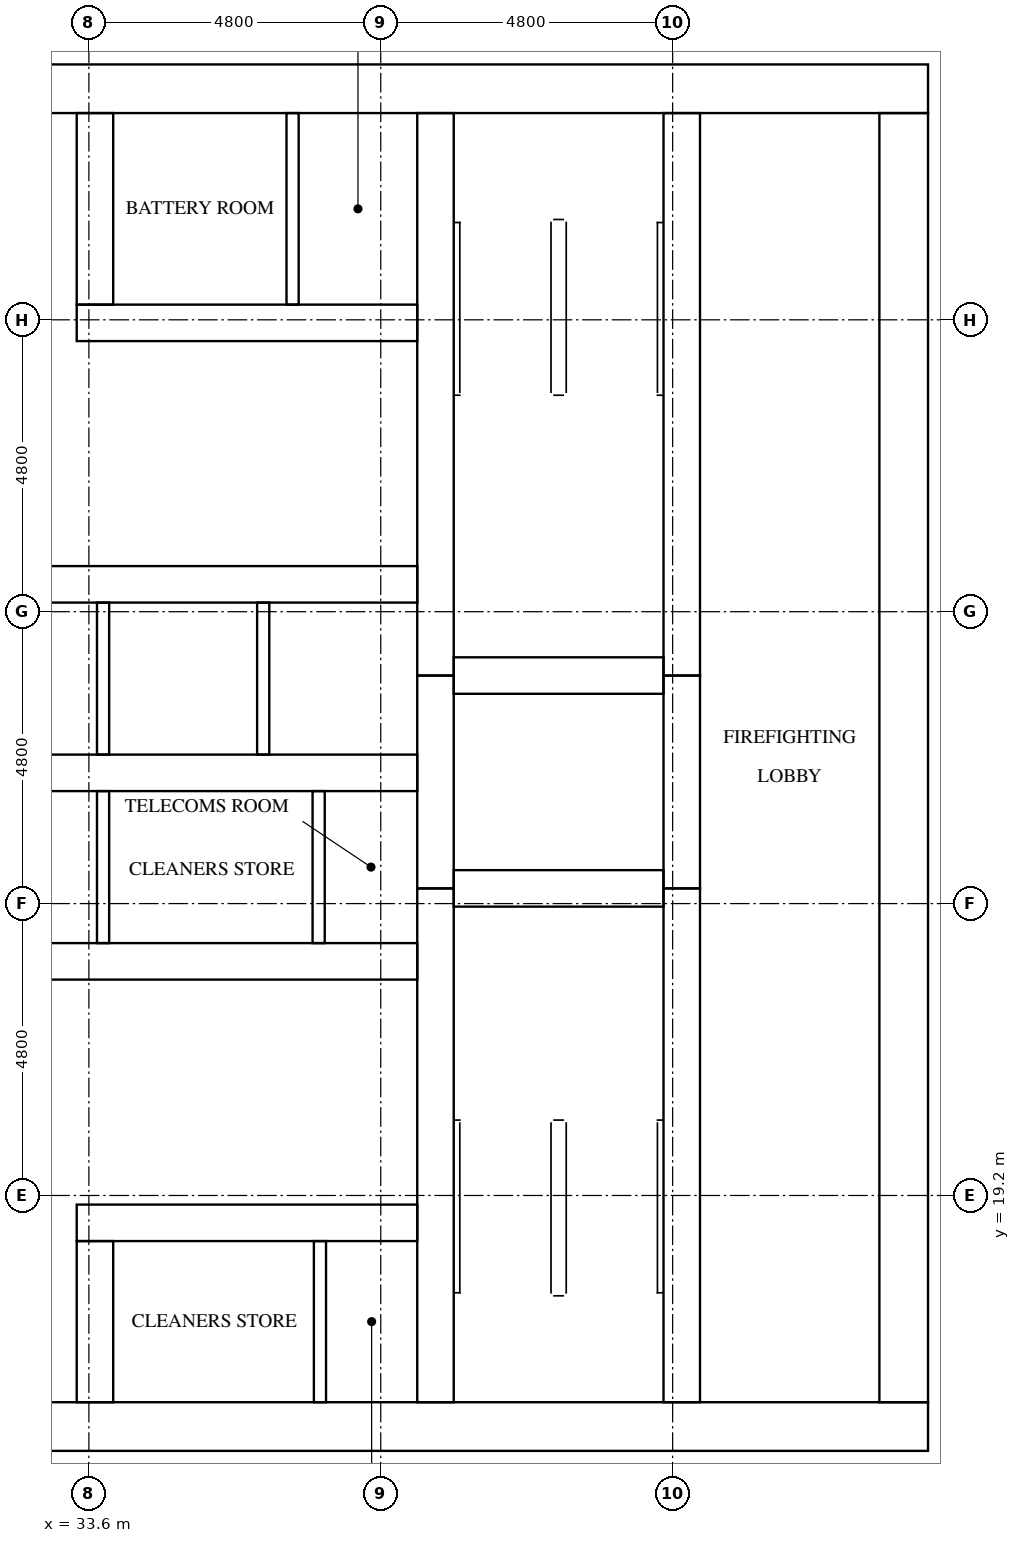
"""IFC4 building model, lengths in metres.
Left out: names, types, materials, properties, quantities, classifications, styles, units other than length and angle.
Written with IfcOpenShell. Run it as: python <this file> out.ifc"""

import sys

from ifc_helpers import new_model, si_unit, direction, frame, frame_2d, origin, place, context, subcontext, project, spatial, rectangle, extrude, element, fill, save


model = new_model("IFC4")
c1 = context("Model", 3, precision=1e-05, world=origin(), true_north=direction((0.0, 1.0)))
c2 = subcontext(c1, "Body", "Model", "MODEL_VIEW")
j1 = project(units=[si_unit("LENGTHUNIT", "METRE"), si_unit("PLANEANGLEUNIT", "RADIAN")], contexts=[c1])
p1 = place(None, origin())
s1 = spatial("IfcSite", under=j1, at=p1, CompositionType="ELEMENT")
p2 = place(p1, origin())
s2 = spatial("IfcBuilding", under=s1, at=p2, CompositionType="ELEMENT")
p3 = place(p2, frame((0.0, 0.0, 149.0)))
s3 = spatial("IfcBuildingStorey", under=s2, at=p3, CompositionType="ELEMENT", Elevation=149.0)
p4 = place(p3, frame((15.0, 15.4, 0.0), z_axis=(0.0, 0.0, 1.0), x_axis=(1.0, 0.0, 0.0)))
e1 = element("IfcWall", 1, at=p4, inside=s3, PredefinedType="SHEAR", context=c2, shape_type="SweptSolid", body=[
    extrude(rectangle(XDim=32.4, YDim=0.8, at=frame_2d((16.2, 0.0))), origin(), (0.0, 0.0, 1.0), 3.2),
])
p5 = place(p4, frame((15.3, 0.0, 0.0)))
e2 = element("IfcOpeningElement", 2, at=p5, cuts=e1, PredefinedType="OPENING", context=c2, shape_type="SweptSolid", body=[
    extrude(rectangle(XDim=1.8, YDim=2.1, at=frame_2d((0.9, 1.05))), frame((0.0, 0.41, 0.0), z_axis=(0.0, -1.0, 0.0), x_axis=(1.0, 0.0, 0.0)), (0.0, 0.0, 1.0), 0.82),
])
p6 = place(p3, frame((15.0, 37.4, 0.0), z_axis=(0.0, 0.0, 1.0), x_axis=(1.0, 0.0, 0.0)))
e3 = element("IfcWall", 3, at=p6, inside=s3, PredefinedType="SHEAR", context=c2, shape_type="SweptSolid", body=[
    extrude(rectangle(XDim=32.4, YDim=0.8, at=frame_2d((16.2, 0.0))), origin(), (0.0, 0.0, 1.0), 3.2),
])
p7 = place(p6, frame((15.3, 0.0, 0.0)))
e4 = element("IfcOpeningElement", 4, at=p7, cuts=e3, PredefinedType="OPENING", context=c2, shape_type="SweptSolid", body=[
    extrude(rectangle(XDim=1.8, YDim=2.1, at=frame_2d((0.9, 1.05))), frame((0.0, 0.41, 0.0), z_axis=(0.0, -1.0, 0.0), x_axis=(1.0, 0.0, 0.0)), (0.0, 0.0, 1.0), 0.82),
])
p8 = place(p6, frame((1.51, 0.0, 0.0)))
e5 = element("IfcOpeningElement", 5, at=p8, cuts=e3, PredefinedType="OPENING", context=c2, shape_type="SweptSolid", body=[
    extrude(rectangle(XDim=1.0, YDim=2.1, at=frame_2d((0.5, 1.05))), frame((0.0, 0.41, 0.0), z_axis=(0.0, -1.0, 0.0), x_axis=(1.0, 0.0, 0.0)), (0.0, 0.0, 1.0), 0.82),
])
p9 = place(p6, frame((5.11, 0.0, 0.0)))
e6 = element("IfcOpeningElement", 6, at=p9, cuts=e3, PredefinedType="OPENING", context=c2, shape_type="SweptSolid", body=[
    extrude(rectangle(XDim=1.0, YDim=2.1, at=frame_2d((0.5, 1.05))), frame((0.0, 0.41, 0.0), z_axis=(0.0, -1.0, 0.0), x_axis=(1.0, 0.0, 0.0)), (0.0, 0.0, 1.0), 0.82),
])
p10 = place(p3, frame((47.0, 15.8, 0.0), z_axis=(0.0, 0.0, 1.0), x_axis=(0.0, 1.0, 0.0)))
e7 = element("IfcWall", 7, at=p10, inside=s3, PredefinedType="SHEAR", context=c2, shape_type="SweptSolid", body=[
    extrude(rectangle(XDim=21.2, YDim=0.8, at=frame_2d((10.6, 0.0))), origin(), (0.0, 0.0, 1.0), 3.2),
])
p11 = place(p10, frame((10.3, 0.0, 0.0)))
e8 = element("IfcOpeningElement", 8, at=p11, cuts=e7, PredefinedType="OPENING", context=c2, shape_type="SweptSolid", body=[
    extrude(rectangle(XDim=1.2, YDim=2.1, at=frame_2d((0.6, 1.05))), frame((0.0, 0.41, 0.0), z_axis=(0.0, -1.0, 0.0), x_axis=(1.0, 0.0, 0.0)), (0.0, 0.0, 1.0), 0.82),
])
p12 = place(p3, frame((39.3, 15.8, 0.0), z_axis=(0.0, 0.0, 1.0), x_axis=(0.0, 1.0, 0.0)))
e9 = element("IfcWall", 9, at=p12, inside=s3, PredefinedType="SHEAR", context=c2, shape_type="SweptSolid", body=[
    extrude(rectangle(XDim=8.45, YDim=0.6, at=frame_2d((4.225, 0.0))), origin(), (0.0, 0.0, 1.0), 3.2),
])
p13 = place(p3, frame((39.3, 24.25, 0.0), z_axis=(0.0, 0.0, 1.0), x_axis=(0.0, 1.0, 0.0)))
e10 = element("IfcWall", 10, at=p13, inside=s3, PredefinedType="SHEAR", context=c2, shape_type="SweptSolid", body=[
    extrude(rectangle(XDim=3.5, YDim=0.6, at=frame_2d((1.75, 0.0))), origin(), (0.0, 0.0, 1.0), 3.2),
])
p14 = place(p3, frame((39.3, 27.75, 0.0), z_axis=(0.0, 0.0, 1.0), x_axis=(0.0, 1.0, 0.0)))
e11 = element("IfcWall", 11, at=p14, inside=s3, PredefinedType="SHEAR", context=c2, shape_type="SweptSolid", body=[
    extrude(rectangle(XDim=9.25, YDim=0.6, at=frame_2d((4.625, 0.0))), origin(), (0.0, 0.0, 1.0), 3.2),
])
p15 = place(p3, frame((43.35, 15.8, 0.0), z_axis=(0.0, 0.0, 1.0), x_axis=(0.0, 1.0, 0.0)))
e12 = element("IfcWall", 12, at=p15, inside=s3, PredefinedType="SHEAR", context=c2, shape_type="SweptSolid", body=[
    extrude(rectangle(XDim=8.45, YDim=0.6, at=frame_2d((4.225, 0.0))), origin(), (0.0, 0.0, 1.0), 3.2),
])
p16 = place(p15, frame((0.4, 0.0, 0.0)))
e13 = element("IfcOpeningElement", 13, at=p16, cuts=e12, PredefinedType="OPENING", context=c2, shape_type="SweptSolid", body=[
    extrude(rectangle(XDim=1.2, YDim=2.1, at=frame_2d((0.6, 1.05))), frame((0.0, 0.31, 0.0), z_axis=(0.0, -1.0, 0.0), x_axis=(1.0, 0.0, 0.0)), (0.0, 0.0, 1.0), 0.62),
])
p17 = place(p3, frame((43.35, 24.25, 0.0), z_axis=(0.0, 0.0, 1.0), x_axis=(0.0, 1.0, 0.0)))
e14 = element("IfcWall", 14, at=p17, inside=s3, PredefinedType="SHEAR", context=c2, shape_type="SweptSolid", body=[
    extrude(rectangle(XDim=3.5, YDim=0.6, at=frame_2d((1.75, 0.0))), origin(), (0.0, 0.0, 1.0), 3.2),
])
p18 = place(p17, frame((1.2, 0.0, 0.0)))
e15 = element("IfcOpeningElement", 15, at=p18, cuts=e14, PredefinedType="OPENING", context=c2, shape_type="SweptSolid", body=[
    extrude(rectangle(XDim=1.1, YDim=2.1, at=frame_2d((0.55, 1.05))), frame((0.0, 0.31, 0.0), z_axis=(0.0, -1.0, 0.0), x_axis=(1.0, 0.0, 0.0)), (0.0, 0.0, 1.0), 0.62),
])
p19 = place(p3, frame((43.35, 27.75, 0.0), z_axis=(0.0, 0.0, 1.0), x_axis=(0.0, 1.0, 0.0)))
e16 = element("IfcWall", 16, at=p19, inside=s3, PredefinedType="SHEAR", context=c2, shape_type="SweptSolid", body=[
    extrude(rectangle(XDim=9.25, YDim=0.6, at=frame_2d((4.625, 0.0))), origin(), (0.0, 0.0, 1.0), 3.2),
])
p20 = place(p19, frame((7.65, 0.0, 0.0)))
e17 = element("IfcOpeningElement", 17, at=p20, cuts=e16, PredefinedType="OPENING", context=c2, shape_type="SweptSolid", body=[
    extrude(rectangle(XDim=1.2, YDim=2.1, at=frame_2d((0.6, 1.05))), frame((0.0, 0.31, 0.0), z_axis=(0.0, -1.0, 0.0), x_axis=(1.0, 0.0, 0.0)), (0.0, 0.0, 1.0), 0.62),
])
for number, where, z_axis, x_axis in (
    (18, (39.6, 24.25, 0.0), (0.0, 0.0, 1.0), (1.0, 0.0, 0.0)),
    (19, (39.6, 27.75, 0.0), (0.0, 0.0, 1.0), (1.0, 0.0, 0.0)),
):
    element("IfcWall", number, at=place(p3, frame(where, z_axis=z_axis, x_axis=x_axis)), inside=s3, PredefinedType="SHEAR", context=c2, shape_type="SweptSolid", body=[
        extrude(rectangle(XDim=3.45, YDim=0.6, at=frame_2d((1.725, 0.0))), origin(), (0.0, 0.0, 1.0), 3.2),
    ])
p21 = place(p3, frame((33.4, 18.75, 0.0), z_axis=(0.0, 0.0, 1.0), x_axis=(1.0, 0.0, 0.0)))
e20 = element("IfcWall", 20, at=p21, inside=s3, PredefinedType="SHEAR", context=c2, shape_type="SweptSolid", body=[
    extrude(rectangle(XDim=5.6, YDim=0.6, at=frame_2d((2.8, 0.0))), origin(), (0.0, 0.0, 1.0), 3.2),
])
p22 = place(p21, frame((1.75, 0.0, 0.0)))
e21 = element("IfcOpeningElement", 21, at=p22, cuts=e20, PredefinedType="OPENING", context=c2, shape_type="SweptSolid", body=[
    extrude(rectangle(XDim=1.0, YDim=2.1, at=frame_2d((0.5, 1.05))), frame((0.0, 0.31, 0.0), z_axis=(0.0, -1.0, 0.0), x_axis=(1.0, 0.0, 0.0)), (0.0, 0.0, 1.0), 0.62),
])
p23 = place(p21, frame((4.35, 0.0, 0.0)))
e22 = element("IfcOpeningElement", 22, at=p23, cuts=e20, PredefinedType="OPENING", context=c2, shape_type="SweptSolid", body=[
    extrude(rectangle(XDim=1.0, YDim=2.1, at=frame_2d((0.5, 1.05))), frame((0.0, 0.31, 0.0), z_axis=(0.0, -1.0, 0.0), x_axis=(1.0, 0.0, 0.0)), (0.0, 0.0, 1.0), 0.62),
])
p24 = place(p3, frame((23.4, 23.05, 0.0), z_axis=(0.0, 0.0, 1.0), x_axis=(1.0, 0.0, 0.0)))
e23 = element("IfcWall", 23, at=p24, inside=s3, PredefinedType="SHEAR", context=c2, shape_type="SweptSolid", body=[
    extrude(rectangle(XDim=15.6, YDim=0.6, at=frame_2d((7.8, 0.0))), origin(), (0.0, 0.0, 1.0), 3.2),
])
p25 = place(p24, frame((2.033, 0.0, 0.0)))
e24 = element("IfcOpeningElement", 24, at=p25, cuts=e23, PredefinedType="OPENING", context=c2, shape_type="SweptSolid", body=[
    extrude(rectangle(XDim=1.0, YDim=2.1, at=frame_2d((0.5, 1.05))), frame((0.0, 0.31, 0.0), z_axis=(0.0, -1.0, 0.0), x_axis=(1.0, 0.0, 0.0)), (0.0, 0.0, 1.0), 0.62),
])
p26 = place(p24, frame((11.706, 0.0, 0.0)))
e25 = element("IfcOpeningElement", 25, at=p26, cuts=e23, PredefinedType="OPENING", context=c2, shape_type="SweptSolid", body=[
    extrude(rectangle(XDim=1.0, YDim=2.1, at=frame_2d((0.5, 1.05))), frame((0.0, 0.31, 0.0), z_axis=(0.0, -1.0, 0.0), x_axis=(1.0, 0.0, 0.0)), (0.0, 0.0, 1.0), 0.62),
])
p27 = place(p24, frame((14.339, 0.0, 0.0)))
e26 = element("IfcOpeningElement", 26, at=p27, cuts=e23, PredefinedType="OPENING", context=c2, shape_type="SweptSolid", body=[
    extrude(rectangle(XDim=1.0, YDim=2.1, at=frame_2d((0.5, 1.05))), frame((0.0, 0.31, 0.0), z_axis=(0.0, -1.0, 0.0), x_axis=(1.0, 0.0, 0.0)), (0.0, 0.0, 1.0), 0.62),
])
p28 = place(p3, frame((23.4, 26.15, 0.0), z_axis=(0.0, 0.0, 1.0), x_axis=(1.0, 0.0, 0.0)))
e27 = element("IfcWall", 27, at=p28, inside=s3, PredefinedType="SHEAR", context=c2, shape_type="SweptSolid", body=[
    extrude(rectangle(XDim=15.6, YDim=0.6, at=frame_2d((7.8, 0.0))), origin(), (0.0, 0.0, 1.0), 3.2),
])
p29 = place(p3, frame((23.4, 29.25, 0.0), z_axis=(0.0, 0.0, 1.0), x_axis=(1.0, 0.0, 0.0)))
e28 = element("IfcWall", 28, at=p29, inside=s3, PredefinedType="SHEAR", context=c2, shape_type="SweptSolid", body=[
    extrude(rectangle(XDim=15.6, YDim=0.6, at=frame_2d((7.8, 0.0))), origin(), (0.0, 0.0, 1.0), 3.2),
])
p30 = place(p29, frame((0.667, 0.0, 0.0)))
e29 = element("IfcOpeningElement", 29, at=p30, cuts=e28, PredefinedType="OPENING", context=c2, shape_type="SweptSolid", body=[
    extrude(rectangle(XDim=1.1, YDim=2.1, at=frame_2d((0.55, 1.05))), frame((0.0, 0.31, 0.0), z_axis=(0.0, -1.0, 0.0), x_axis=(1.0, 0.0, 0.0)), (0.0, 0.0, 1.0), 0.62),
])
p31 = place(p29, frame((3.3, 0.0, 0.0)))
e30 = element("IfcOpeningElement", 30, at=p31, cuts=e28, PredefinedType="OPENING", context=c2, shape_type="SweptSolid", body=[
    extrude(rectangle(XDim=1.1, YDim=2.1, at=frame_2d((0.55, 1.05))), frame((0.0, 0.31, 0.0), z_axis=(0.0, -1.0, 0.0), x_axis=(1.0, 0.0, 0.0)), (0.0, 0.0, 1.0), 0.62),
])
p32 = place(p29, frame((5.933, 0.0, 0.0)))
e31 = element("IfcOpeningElement", 31, at=p32, cuts=e28, PredefinedType="OPENING", context=c2, shape_type="SweptSolid", body=[
    extrude(rectangle(XDim=1.1, YDim=2.1, at=frame_2d((0.55, 1.05))), frame((0.0, 0.31, 0.0), z_axis=(0.0, -1.0, 0.0), x_axis=(1.0, 0.0, 0.0)), (0.0, 0.0, 1.0), 0.62),
])
p33 = place(p29, frame((8.567, 0.0, 0.0)))
e32 = element("IfcOpeningElement", 32, at=p33, cuts=e28, PredefinedType="OPENING", context=c2, shape_type="SweptSolid", body=[
    extrude(rectangle(XDim=1.1, YDim=2.1, at=frame_2d((0.55, 1.05))), frame((0.0, 0.31, 0.0), z_axis=(0.0, -1.0, 0.0), x_axis=(1.0, 0.0, 0.0)), (0.0, 0.0, 1.0), 0.62),
])
p34 = place(p29, frame((11.2, 0.0, 0.0)))
e33 = element("IfcOpeningElement", 33, at=p34, cuts=e28, PredefinedType="OPENING", context=c2, shape_type="SweptSolid", body=[
    extrude(rectangle(XDim=1.1, YDim=2.1, at=frame_2d((0.55, 1.05))), frame((0.0, 0.31, 0.0), z_axis=(0.0, -1.0, 0.0), x_axis=(1.0, 0.0, 0.0)), (0.0, 0.0, 1.0), 0.62),
])
p35 = place(p29, frame((13.833, 0.0, 0.0)))
e34 = element("IfcOpeningElement", 34, at=p35, cuts=e28, PredefinedType="OPENING", context=c2, shape_type="SweptSolid", body=[
    extrude(rectangle(XDim=1.1, YDim=2.1, at=frame_2d((0.55, 1.05))), frame((0.0, 0.31, 0.0), z_axis=(0.0, -1.0, 0.0), x_axis=(1.0, 0.0, 0.0)), (0.0, 0.0, 1.0), 0.62),
])
p36 = place(p3, frame((33.4, 33.55, 0.0), z_axis=(0.0, 0.0, 1.0), x_axis=(1.0, 0.0, 0.0)))
e35 = element("IfcWall", 35, at=p36, inside=s3, PredefinedType="SHEAR", context=c2, shape_type="SweptSolid", body=[
    extrude(rectangle(XDim=5.6, YDim=0.6, at=frame_2d((2.8, 0.0))), origin(), (0.0, 0.0, 1.0), 3.2),
])
p37 = place(p36, frame((1.525, 0.0, 0.0)))
e36 = element("IfcOpeningElement", 36, at=p37, cuts=e35, PredefinedType="OPENING", context=c2, shape_type="SweptSolid", body=[
    extrude(rectangle(XDim=1.0, YDim=2.1, at=frame_2d((0.5, 1.05))), frame((0.0, 0.31, 0.0), z_axis=(0.0, -1.0, 0.0), x_axis=(1.0, 0.0, 0.0)), (0.0, 0.0, 1.0), 0.62),
])
p38 = place(p36, frame((4.125, 0.0, 0.0)))
e37 = element("IfcOpeningElement", 37, at=p38, cuts=e35, PredefinedType="OPENING", context=c2, shape_type="SweptSolid", body=[
    extrude(rectangle(XDim=1.0, YDim=2.1, at=frame_2d((0.5, 1.05))), frame((0.0, 0.31, 0.0), z_axis=(0.0, -1.0, 0.0), x_axis=(1.0, 0.0, 0.0)), (0.0, 0.0, 1.0), 0.62),
])
p39 = place(p3, frame((33.7, 15.8, 0.0), z_axis=(0.0, 0.0, 1.0), x_axis=(0.0, 1.0, 0.0)))
e38 = element("IfcWall", 38, at=p39, inside=s3, PredefinedType="SHEAR", context=c2, shape_type="SweptSolid", body=[
    extrude(rectangle(XDim=2.65, YDim=0.6, at=frame_2d((1.325, 0.0))), origin(), (0.0, 0.0, 1.0), 3.2),
])
p40 = place(p3, frame((33.7, 33.85, 0.0), z_axis=(0.0, 0.0, 1.0), x_axis=(0.0, 1.0, 0.0)))
e39 = element("IfcWall", 39, at=p40, inside=s3, PredefinedType="SHEAR", context=c2, shape_type="SweptSolid", body=[
    extrude(rectangle(XDim=3.15, YDim=0.6, at=frame_2d((1.575, 0.0))), origin(), (0.0, 0.0, 1.0), 3.2),
])
for number, where, z_axis, x_axis in (
    (40, (33.833, 23.35, 0.0), (0.0, 0.0, 1.0), (0.0, 1.0, 0.0)),
    (41, (33.833, 26.45, 0.0), (0.0, 0.0, 1.0), (0.0, 1.0, 0.0)),
    (42, (36.467, 26.45, 0.0), (0.0, 0.0, 1.0), (0.0, 1.0, 0.0)),
):
    element("IfcWall", number, at=place(p3, frame(where, z_axis=z_axis, x_axis=x_axis)), inside=s3, PredefinedType="SOLIDWALL", context=c2, shape_type="SweptSolid", body=[
        extrude(rectangle(XDim=2.5, YDim=0.2, at=frame_2d((1.25, 0.0))), origin(), (0.0, 0.0, 1.0), 3.2),
    ])
p41 = place(p3, frame((37.379, 23.35, 0.0), z_axis=(0.0, 0.0, 1.0), x_axis=(0.0, 1.0, 0.0)))
e43 = element("IfcWall", 43, at=p41, inside=s3, PredefinedType="PARTITIONING", context=c2, shape_type="SweptSolid", body=[
    extrude(rectangle(XDim=2.5, YDim=0.2, at=frame_2d((1.25, 0.0))), origin(), (0.0, 0.0, 1.0), 3.2),
])
p42 = place(p3, frame((37.4, 15.8, 0.0), z_axis=(0.0, 0.0, 1.0), x_axis=(0.0, 1.0, 0.0)))
e44 = element("IfcWall", 44, at=p42, inside=s3, PredefinedType="PARTITIONING", context=c2, shape_type="SweptSolid", body=[
    extrude(rectangle(XDim=2.65, YDim=0.2, at=frame_2d((1.325, 0.0))), origin(), (0.0, 0.0, 1.0), 3.2),
])
p43 = place(p3, frame((36.95, 33.85, 0.0), z_axis=(0.0, 0.0, 1.0), x_axis=(0.0, 1.0, 0.0)))
e45 = element("IfcWall", 45, at=p43, inside=s3, PredefinedType="PARTITIONING", context=c2, shape_type="SweptSolid", body=[
    extrude(rectangle(XDim=3.15, YDim=0.2, at=frame_2d((1.575, 0.0))), origin(), (0.0, 0.0, 1.0), 3.2),
])
p44 = place(p33, origin())
e46 = element("IfcDoor", 46, at=p44, inside=s3, OperationType="DOUBLE_DOOR_SLIDING", PredefinedType="DOOR", context=c2, shape_type="SweptSolid", body=[
    extrude(rectangle(XDim=1.1, YDim=2.1, at=frame_2d((0.55, 1.05))), frame((0.0, 0.025, 0.0), z_axis=(0.0, -1.0, 0.0), x_axis=(1.0, 0.0, 0.0)), (0.0, 0.0, 1.0), 0.05),
])
fill(e32, e46)
p45 = place(p34, origin())
e47 = element("IfcDoor", 47, at=p45, inside=s3, OperationType="DOUBLE_DOOR_SLIDING", PredefinedType="DOOR", context=c2, shape_type="SweptSolid", body=[
    extrude(rectangle(XDim=1.1, YDim=2.1, at=frame_2d((0.55, 1.05))), frame((0.0, 0.025, 0.0), z_axis=(0.0, -1.0, 0.0), x_axis=(1.0, 0.0, 0.0)), (0.0, 0.0, 1.0), 0.05),
])
fill(e33, e47)
p46 = place(p35, origin())
e48 = element("IfcDoor", 48, at=p46, inside=s3, OperationType="DOUBLE_DOOR_SLIDING", PredefinedType="DOOR", context=c2, shape_type="SweptSolid", body=[
    extrude(rectangle(XDim=1.1, YDim=2.1, at=frame_2d((0.55, 1.05))), frame((0.0, 0.025, 0.0), z_axis=(0.0, -1.0, 0.0), x_axis=(1.0, 0.0, 0.0)), (0.0, 0.0, 1.0), 0.05),
])
fill(e34, e48)
p47 = place(p18, origin())
e49 = element("IfcDoor", 49, at=p47, inside=s3, OperationType="DOUBLE_DOOR_SLIDING", PredefinedType="DOOR", context=c2, shape_type="SweptSolid", body=[
    extrude(rectangle(XDim=1.1, YDim=2.1, at=frame_2d((0.55, 1.05))), frame((0.0, 0.025, 0.0), z_axis=(0.0, -1.0, 0.0), x_axis=(1.0, 0.0, 0.0)), (0.0, 0.0, 1.0), 0.05),
])
fill(e15, e49)
p48 = place(p16, origin())
e50 = element("IfcDoor", 50, at=p48, inside=s3, OperationType="SINGLE_SWING_LEFT", PredefinedType="DOOR", context=c2, shape_type="SweptSolid", body=[
    extrude(rectangle(XDim=1.2, YDim=2.1, at=frame_2d((0.6, 1.05))), frame((0.0, 0.025, 0.0), z_axis=(0.0, -1.0, 0.0), x_axis=(1.0, 0.0, 0.0)), (0.0, 0.0, 1.0), 0.05),
])
fill(e13, e50)
p49 = place(p20, origin())
e51 = element("IfcDoor", 51, at=p49, inside=s3, OperationType="SINGLE_SWING_RIGHT", PredefinedType="DOOR", context=c2, shape_type="SweptSolid", body=[
    extrude(rectangle(XDim=1.2, YDim=2.1, at=frame_2d((0.6, 1.05))), frame((0.0, 0.025, 0.0), z_axis=(0.0, -1.0, 0.0), x_axis=(1.0, 0.0, 0.0)), (0.0, 0.0, 1.0), 0.05),
])
fill(e17, e51)
p50 = place(p11, origin())
e52 = element("IfcDoor", 52, at=p50, inside=s3, OperationType="SINGLE_SWING_RIGHT", PredefinedType="DOOR", context=c2, shape_type="SweptSolid", body=[
    extrude(rectangle(XDim=1.2, YDim=2.1, at=frame_2d((0.6, 1.05))), frame((0.0, 0.025, 0.0), z_axis=(0.0, -1.0, 0.0), x_axis=(1.0, 0.0, 0.0)), (0.0, 0.0, 1.0), 0.05),
])
fill(e8, e52)
p51 = place(p26, frame((1.0, 0.0, 0.0), z_axis=(0.0, 0.0, 1.0), x_axis=(-1.0, 0.0, 0.0)))
e53 = element("IfcDoor", 53, at=p51, inside=s3, OperationType="SINGLE_SWING_RIGHT", PredefinedType="DOOR", context=c2, shape_type="SweptSolid", body=[
    extrude(rectangle(XDim=1.0, YDim=2.1, at=frame_2d((0.5, 1.05))), frame((0.0, 0.025, 0.0), z_axis=(0.0, -1.0, 0.0), x_axis=(1.0, 0.0, 0.0)), (0.0, 0.0, 1.0), 0.05),
])
fill(e25, e53)
p52 = place(p27, frame((1.0, 0.0, 0.0), z_axis=(0.0, 0.0, 1.0), x_axis=(-1.0, 0.0, 0.0)))
e54 = element("IfcDoor", 54, at=p52, inside=s3, OperationType="SINGLE_SWING_LEFT", PredefinedType="DOOR", context=c2, shape_type="SweptSolid", body=[
    extrude(rectangle(XDim=1.0, YDim=2.1, at=frame_2d((0.5, 1.05))), frame((0.0, 0.025, 0.0), z_axis=(0.0, -1.0, 0.0), x_axis=(1.0, 0.0, 0.0)), (0.0, 0.0, 1.0), 0.05),
])
fill(e26, e54)
p53 = place(p22, origin())
e55 = element("IfcDoor", 55, at=p53, inside=s3, OperationType="SINGLE_SWING_RIGHT", PredefinedType="DOOR", context=c2, shape_type="SweptSolid", body=[
    extrude(rectangle(XDim=1.0, YDim=2.1, at=frame_2d((0.5, 1.05))), frame((0.0, 0.025, 0.0), z_axis=(0.0, -1.0, 0.0), x_axis=(1.0, 0.0, 0.0)), (0.0, 0.0, 1.0), 0.05),
])
fill(e21, e55)
p54 = place(p23, origin())
e56 = element("IfcDoor", 56, at=p54, inside=s3, OperationType="SINGLE_SWING_LEFT", PredefinedType="DOOR", context=c2, shape_type="SweptSolid", body=[
    extrude(rectangle(XDim=1.0, YDim=2.1, at=frame_2d((0.5, 1.05))), frame((0.0, 0.025, 0.0), z_axis=(0.0, -1.0, 0.0), x_axis=(1.0, 0.0, 0.0)), (0.0, 0.0, 1.0), 0.05),
])
fill(e22, e56)
p55 = place(p37, frame((1.0, 0.0, 0.0), z_axis=(0.0, 0.0, 1.0), x_axis=(-1.0, 0.0, 0.0)))
e57 = element("IfcDoor", 57, at=p55, inside=s3, OperationType="SINGLE_SWING_RIGHT", PredefinedType="DOOR", context=c2, shape_type="SweptSolid", body=[
    extrude(rectangle(XDim=1.0, YDim=2.1, at=frame_2d((0.5, 1.05))), frame((0.0, 0.025, 0.0), z_axis=(0.0, -1.0, 0.0), x_axis=(1.0, 0.0, 0.0)), (0.0, 0.0, 1.0), 0.05),
])
fill(e36, e57)
p56 = place(p38, frame((1.0, 0.0, 0.0), z_axis=(0.0, 0.0, 1.0), x_axis=(-1.0, 0.0, 0.0)))
e58 = element("IfcDoor", 58, at=p56, inside=s3, OperationType="SINGLE_SWING_LEFT", PredefinedType="DOOR", context=c2, shape_type="SweptSolid", body=[
    extrude(rectangle(XDim=1.0, YDim=2.1, at=frame_2d((0.5, 1.05))), frame((0.0, 0.025, 0.0), z_axis=(0.0, -1.0, 0.0), x_axis=(1.0, 0.0, 0.0)), (0.0, 0.0, 1.0), 0.05),
])
fill(e37, e58)
save(model, sys.argv[1])
